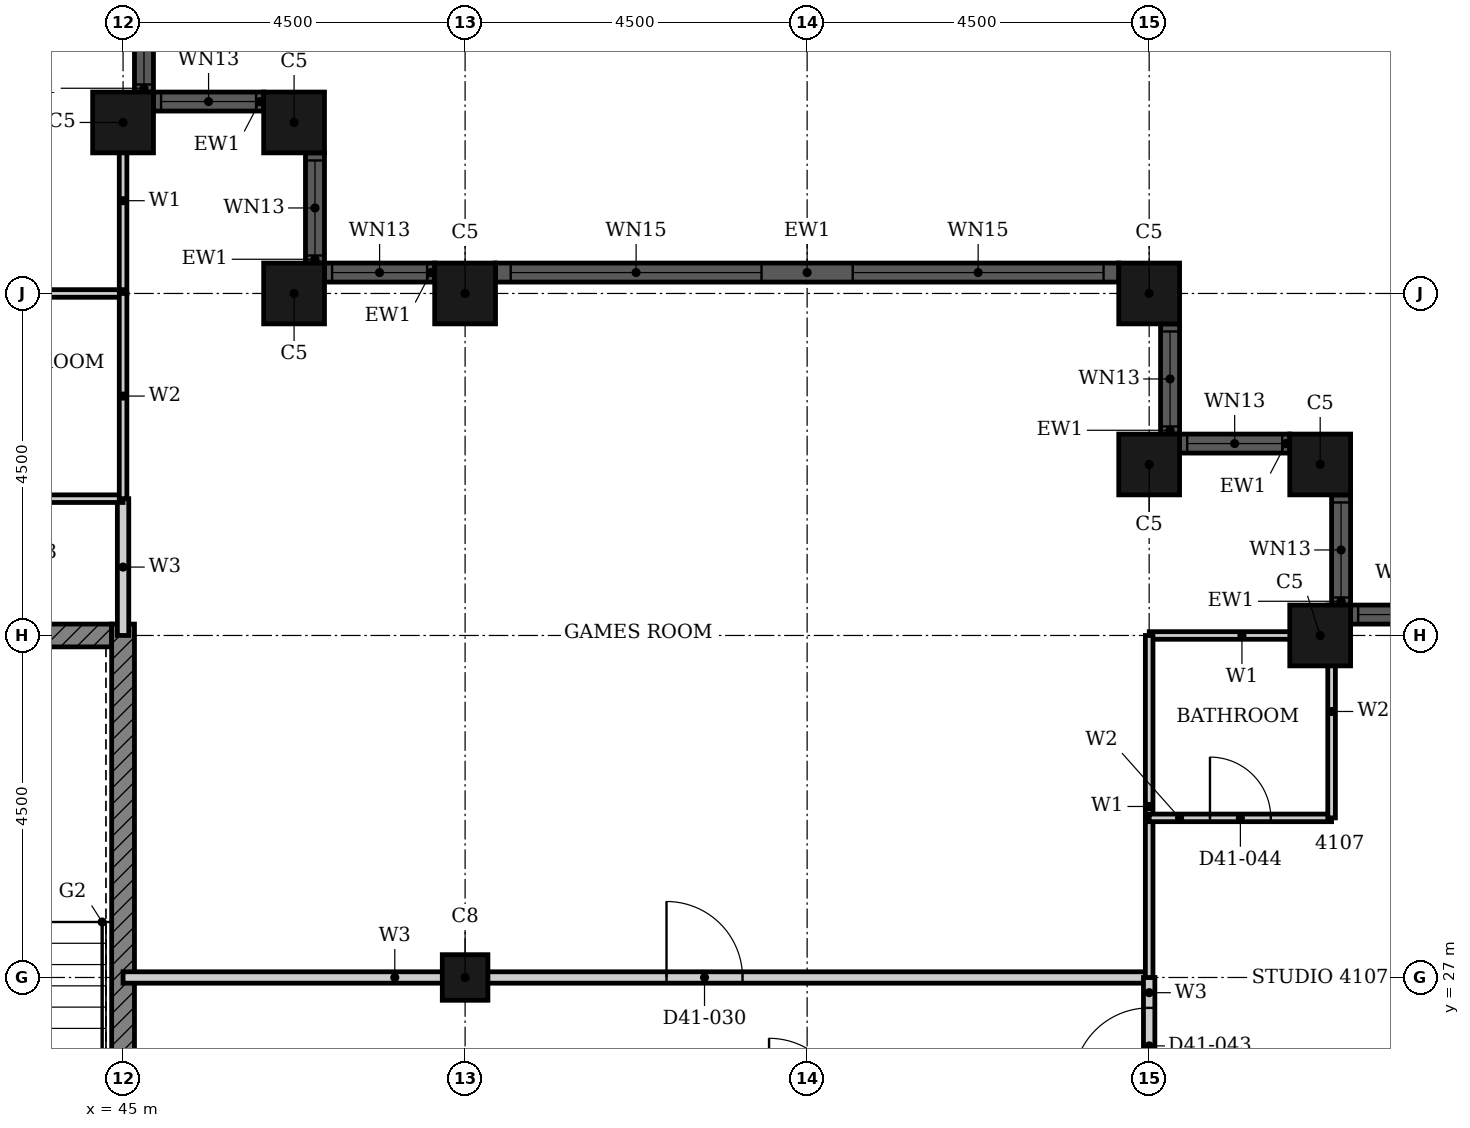
"""IFC4 building model, lengths in metres.
Left out: names, types, materials, properties, quantities, classifications, styles, units other than length and angle.
Written with IfcOpenShell. Run it as: python <this file> out.ifc"""

import sys

from ifc_helpers import new_model, si_unit, direction, frame, frame_2d, origin, origin_2d, place, context, subcontext, project, spatial, rectangle, hollow_rectangle, extrude, element, fill, save


model = new_model("IFC4")
c1 = context("Model", 3, precision=1e-05, world=origin(), true_north=direction((0.0, 1.0)))
c2 = subcontext(c1, "Body", "Model", "MODEL_VIEW")
j1 = project(units=[si_unit("LENGTHUNIT", "METRE"), si_unit("PLANEANGLEUNIT", "RADIAN")], contexts=[c1])
p1 = place(None, origin())
s1 = spatial("IfcSite", under=j1, at=p1, CompositionType="ELEMENT")
p2 = place(p1, origin())
s2 = spatial("IfcBuilding", under=s1, at=p2, CompositionType="ELEMENT")
p3 = place(p2, frame((0.0, 0.0, 165.4)))
s3 = spatial("IfcBuildingStorey", under=s2, at=p3, CompositionType="ELEMENT", Elevation=165.4)
for number, where, z_axis, x_axis in (
    (1, (60.75, 31.5, 0.0), (0.0, 0.0, 1.0), (1.0, 0.0, 0.0)),
    (2, (60.75, 33.75, 0.0), (0.0, 0.0, 1.0), (1.0, 0.0, 0.0)),
    (3, (58.5, 33.75, 0.0), (0.0, 0.0, 1.0), (1.0, 0.0, 0.0)),
    (4, (58.5, 36.0, 0.0), (0.0, 0.0, 1.0), (1.0, 0.0, 0.0)),
    (5, (49.5, 36.0, 0.0), (0.0, 0.0, 1.0), (1.0, 0.0, 0.0)),
    (6, (47.25, 36.0, 0.0), (0.0, 0.0, 1.0), (1.0, 0.0, 0.0)),
    (7, (47.25, 38.25, 0.0), (0.0, 0.0, 1.0), (1.0, 0.0, 0.0)),
    (8, (45.0, 38.25, 0.0), (0.0, 0.0, 1.0), (1.0, 0.0, 0.0)),
):
    element("IfcColumn", number, at=place(p3, frame(where, z_axis=z_axis, x_axis=x_axis)), inside=s3, PredefinedType="COLUMN", context=c2, shape_type="SweptSolid", body=[
        extrude(hollow_rectangle(XDim=0.8, YDim=0.8, WallThickness=0.025, at=origin_2d()), origin(), (0.0, 0.0, 1.0), 3.7),
    ])
p4 = place(p3, frame((49.5, 27.0, 0.0), z_axis=(0.0, 0.0, 1.0), x_axis=(1.0, 0.0, 0.0)))
e9 = element("IfcColumn", 9, at=p4, inside=s3, PredefinedType="COLUMN", context=c2, shape_type="SweptSolid", body=[
    extrude(hollow_rectangle(XDim=0.6, YDim=0.6, WallThickness=0.02, at=origin_2d()), origin(), (0.0, 0.0, 1.0), 3.7),
])
p5 = place(p3, frame((62.6, 31.775, 0.0), z_axis=(0.0, 0.0, 1.0), x_axis=(-1.0, 0.0, 0.0)))
e10 = element("IfcWall", 10, at=p5, inside=s3, PredefinedType="SOLIDWALL", context=c2, shape_type="SweptSolid", body=[
    extrude(rectangle(XDim=1.45, YDim=0.25, at=frame_2d((0.725, 0.0))), origin(), (0.0, 0.0, 1.0), 3.7),
])
p6 = place(p5, frame((0.1, 0.0, 0.9)))
e11 = element("IfcOpeningElement", 11, at=p6, cuts=e10, PredefinedType="OPENING", context=c2, shape_type="SweptSolid", body=[
    extrude(rectangle(XDim=1.25, YDim=1.85, at=frame_2d((0.625, 0.925))), frame((0.0, 0.135, 0.0), z_axis=(0.0, -1.0, 0.0), x_axis=(1.0, 0.0, 0.0)), (0.0, 0.0, 1.0), 0.27),
])
p7 = place(p3, frame((61.025, 31.9, 0.0), z_axis=(0.0, 0.0, 1.0), x_axis=(0.0, 1.0, 0.0)))
e12 = element("IfcWall", 12, at=p7, inside=s3, PredefinedType="SOLIDWALL", context=c2, shape_type="SweptSolid", body=[
    extrude(rectangle(XDim=1.45, YDim=0.25, at=frame_2d((0.725, 0.0))), origin(), (0.0, 0.0, 1.0), 3.7),
])
p8 = place(p7, frame((0.1, 0.0, 0.9)))
e13 = element("IfcOpeningElement", 13, at=p8, cuts=e12, PredefinedType="OPENING", context=c2, shape_type="SweptSolid", body=[
    extrude(rectangle(XDim=1.25, YDim=1.85, at=frame_2d((0.625, 0.925))), frame((0.0, 0.135, 0.0), z_axis=(0.0, -1.0, 0.0), x_axis=(1.0, 0.0, 0.0)), (0.0, 0.0, 1.0), 0.27),
])
p9 = place(p3, frame((60.35, 34.025, 0.0), z_axis=(0.0, 0.0, 1.0), x_axis=(-1.0, 0.0, 0.0)))
e14 = element("IfcWall", 14, at=p9, inside=s3, PredefinedType="SOLIDWALL", context=c2, shape_type="SweptSolid", body=[
    extrude(rectangle(XDim=1.45, YDim=0.25, at=frame_2d((0.725, 0.0))), origin(), (0.0, 0.0, 1.0), 3.7),
])
p10 = place(p9, frame((0.1, 0.0, 0.9)))
e15 = element("IfcOpeningElement", 15, at=p10, cuts=e14, PredefinedType="OPENING", context=c2, shape_type="SweptSolid", body=[
    extrude(rectangle(XDim=1.25, YDim=1.85, at=frame_2d((0.625, 0.925))), frame((0.0, 0.135, 0.0), z_axis=(0.0, -1.0, 0.0), x_axis=(1.0, 0.0, 0.0)), (0.0, 0.0, 1.0), 0.27),
])
p11 = place(p3, frame((58.775, 34.15, 0.0), z_axis=(0.0, 0.0, 1.0), x_axis=(0.0, 1.0, 0.0)))
e16 = element("IfcWall", 16, at=p11, inside=s3, PredefinedType="SOLIDWALL", context=c2, shape_type="SweptSolid", body=[
    extrude(rectangle(XDim=1.45, YDim=0.25, at=frame_2d((0.725, 0.0))), origin(), (0.0, 0.0, 1.0), 3.7),
])
p12 = place(p11, frame((0.1, 0.0, 0.9)))
e17 = element("IfcOpeningElement", 17, at=p12, cuts=e16, PredefinedType="OPENING", context=c2, shape_type="SweptSolid", body=[
    extrude(rectangle(XDim=1.25, YDim=1.85, at=frame_2d((0.625, 0.925))), frame((0.0, 0.135, 0.0), z_axis=(0.0, -1.0, 0.0), x_axis=(1.0, 0.0, 0.0)), (0.0, 0.0, 1.0), 0.27),
])
p13 = place(p3, frame((58.1, 36.275, 0.0), z_axis=(0.0, 0.0, 1.0), x_axis=(-1.0, 0.0, 0.0)))
e18 = element("IfcWall", 18, at=p13, inside=s3, PredefinedType="SOLIDWALL", context=c2, shape_type="SweptSolid", body=[
    extrude(rectangle(XDim=8.2, YDim=0.25, at=frame_2d((4.1, 0.0))), origin(), (0.0, 0.0, 1.0), 3.7),
])
p14 = place(p13, frame((0.2, 0.0, 0.45)))
e19 = element("IfcOpeningElement", 19, at=p14, cuts=e18, PredefinedType="OPENING", context=c2, shape_type="SweptSolid", body=[
    extrude(rectangle(XDim=3.3, YDim=2.3, at=frame_2d((1.65, 1.15))), frame((0.0, 0.135, 0.0), z_axis=(0.0, -1.0, 0.0), x_axis=(1.0, 0.0, 0.0)), (0.0, 0.0, 1.0), 0.27),
])
p15 = place(p13, frame((4.7, 0.0, 0.45)))
e20 = element("IfcOpeningElement", 20, at=p15, cuts=e18, PredefinedType="OPENING", context=c2, shape_type="SweptSolid", body=[
    extrude(rectangle(XDim=3.3, YDim=2.3, at=frame_2d((1.65, 1.15))), frame((0.0, 0.135, 0.0), z_axis=(0.0, -1.0, 0.0), x_axis=(1.0, 0.0, 0.0)), (0.0, 0.0, 1.0), 0.27),
])
p16 = place(p3, frame((49.1, 36.275, 0.0), z_axis=(0.0, 0.0, 1.0), x_axis=(-1.0, 0.0, 0.0)))
e21 = element("IfcWall", 21, at=p16, inside=s3, PredefinedType="SOLIDWALL", context=c2, shape_type="SweptSolid", body=[
    extrude(rectangle(XDim=1.45, YDim=0.25, at=frame_2d((0.725, 0.0))), origin(), (0.0, 0.0, 1.0), 3.7),
])
p17 = place(p16, frame((0.1, 0.0, 0.9)))
e22 = element("IfcOpeningElement", 22, at=p17, cuts=e21, PredefinedType="OPENING", context=c2, shape_type="SweptSolid", body=[
    extrude(rectangle(XDim=1.25, YDim=1.85, at=frame_2d((0.625, 0.925))), frame((0.0, 0.135, 0.0), z_axis=(0.0, -1.0, 0.0), x_axis=(1.0, 0.0, 0.0)), (0.0, 0.0, 1.0), 0.27),
])
p18 = place(p3, frame((47.525, 36.4, 0.0), z_axis=(0.0, 0.0, 1.0), x_axis=(0.0, 1.0, 0.0)))
e23 = element("IfcWall", 23, at=p18, inside=s3, PredefinedType="SOLIDWALL", context=c2, shape_type="SweptSolid", body=[
    extrude(rectangle(XDim=1.45, YDim=0.25, at=frame_2d((0.725, 0.0))), origin(), (0.0, 0.0, 1.0), 3.7),
])
p19 = place(p18, frame((0.1, 0.0, 0.9)))
e24 = element("IfcOpeningElement", 24, at=p19, cuts=e23, PredefinedType="OPENING", context=c2, shape_type="SweptSolid", body=[
    extrude(rectangle(XDim=1.25, YDim=1.85, at=frame_2d((0.625, 0.925))), frame((0.0, 0.135, 0.0), z_axis=(0.0, -1.0, 0.0), x_axis=(1.0, 0.0, 0.0)), (0.0, 0.0, 1.0), 0.27),
])
p20 = place(p3, frame((46.85, 38.525, 0.0), z_axis=(0.0, 0.0, 1.0), x_axis=(-1.0, 0.0, 0.0)))
e25 = element("IfcWall", 25, at=p20, inside=s3, PredefinedType="SOLIDWALL", context=c2, shape_type="SweptSolid", body=[
    extrude(rectangle(XDim=1.45, YDim=0.25, at=frame_2d((0.725, 0.0))), origin(), (0.0, 0.0, 1.0), 3.7),
])
p21 = place(p20, frame((0.1, 0.0, 0.9)))
e26 = element("IfcOpeningElement", 26, at=p21, cuts=e25, PredefinedType="OPENING", context=c2, shape_type="SweptSolid", body=[
    extrude(rectangle(XDim=1.25, YDim=1.85, at=frame_2d((0.625, 0.925))), frame((0.0, 0.135, 0.0), z_axis=(0.0, -1.0, 0.0), x_axis=(1.0, 0.0, 0.0)), (0.0, 0.0, 1.0), 0.27),
])
p22 = place(p3, frame((45.275, 38.65, 0.0), z_axis=(0.0, 0.0, 1.0), x_axis=(0.0, 1.0, 0.0)))
e27 = element("IfcWall", 27, at=p22, inside=s3, PredefinedType="SOLIDWALL", context=c2, shape_type="SweptSolid", body=[
    extrude(rectangle(XDim=1.45, YDim=0.25, at=frame_2d((0.725, 0.0))), origin(), (0.0, 0.0, 1.0), 3.7),
])
p23 = place(p22, frame((0.1, 0.0, 0.9)))
e28 = element("IfcOpeningElement", 28, at=p23, cuts=e27, PredefinedType="OPENING", context=c2, shape_type="SweptSolid", body=[
    extrude(rectangle(XDim=1.25, YDim=1.85, at=frame_2d((0.625, 0.925))), frame((0.0, 0.135, 0.0), z_axis=(0.0, -1.0, 0.0), x_axis=(1.0, 0.0, 0.0)), (0.0, 0.0, 1.0), 0.27),
])
p24 = place(p3, frame((40.625, 31.5, 0.0), z_axis=(0.0, 0.0, 1.0), x_axis=(1.0, 0.0, 0.0)))
e29 = element("IfcWall", 29, at=p24, inside=s3, PredefinedType="SHEAR", context=c2, shape_type="SweptSolid", body=[
    extrude(rectangle(XDim=4.225, YDim=0.3, at=frame_2d((2.113, 0.0))), origin(), (0.0, 0.0, 1.0), 3.4),
])
p25 = place(p3, frame((45.0, 22.35, 0.0), z_axis=(0.0, 0.0, 1.0), x_axis=(0.0, 1.0, 0.0)))
e30 = element("IfcWall", 30, at=p25, inside=s3, PredefinedType="SHEAR", context=c2, shape_type="SweptSolid", body=[
    extrude(rectangle(XDim=9.3, YDim=0.3, at=frame_2d((4.65, 0.0))), origin(), (0.0, 0.0, 1.0), 3.4),
])
p26 = place(p3, frame((45.0, 27.0, 0.0), z_axis=(0.0, 0.0, 1.0), x_axis=(1.0, 0.0, 0.0)))
e31 = element("IfcWall", 31, at=p26, inside=s3, PredefinedType="PARTITIONING", context=c2, shape_type="SweptSolid", body=[
    extrude(rectangle(XDim=13.5, YDim=0.15, at=frame_2d((6.75, 0.0))), origin(), (0.0, 0.0, 1.0), 2.68),
])
p27 = place(p26, frame((7.15, 0.0, 0.0)))
e32 = element("IfcOpeningElement", 32, at=p27, cuts=e31, PredefinedType="OPENING", context=c2, shape_type="SweptSolid", body=[
    extrude(rectangle(XDim=1.0, YDim=2.1, at=frame_2d((0.5, 1.05))), frame((0.0, 0.085, 0.0), z_axis=(0.0, -1.0, 0.0), x_axis=(1.0, 0.0, 0.0)), (0.0, 0.0, 1.0), 0.17),
])
p28 = place(p3, frame((45.0, 31.5, 0.0), z_axis=(0.0, 0.0, 1.0), x_axis=(0.0, 1.0, 0.0)))
e33 = element("IfcWall", 33, at=p28, inside=s3, PredefinedType="PARTITIONING", context=c2, shape_type="SweptSolid", body=[
    extrude(rectangle(XDim=1.8, YDim=0.15, at=frame_2d((0.9, 0.0))), origin(), (0.0, 0.0, 1.0), 3.4),
])
p29 = place(p3, frame((58.5, 25.2, 0.0), z_axis=(0.0, 0.0, 1.0), x_axis=(0.0, 1.0, 0.0)))
e34 = element("IfcWall", 34, at=p29, inside=s3, PredefinedType="PARTITIONING", context=c2, shape_type="SweptSolid", body=[
    extrude(rectangle(XDim=1.8, YDim=0.15, at=frame_2d((0.9, 0.0))), origin(), (0.0, 0.0, 1.0), 3.4),
])
p30 = place(p29, frame((0.4, 0.0, 0.0)))
e35 = element("IfcOpeningElement", 35, at=p30, cuts=e34, PredefinedType="OPENING", context=c2, shape_type="SweptSolid", body=[
    extrude(rectangle(XDim=1.0, YDim=2.2, at=frame_2d((0.5, 1.1))), frame((0.0, 0.085, 0.0), z_axis=(0.0, -1.0, 0.0), x_axis=(1.0, 0.0, 0.0)), (0.0, 0.0, 1.0), 0.17),
])
p31 = place(p3, frame((58.501, 31.5, 0.0), z_axis=(0.0, 0.0, 1.0), x_axis=(1.0, 0.0, 0.0)))
e36 = element("IfcWall", 36, at=p31, inside=s3, PredefinedType="PARTITIONING", context=c2, shape_type="SweptSolid", body=[
    extrude(rectangle(XDim=2.439, YDim=0.1, at=frame_2d((1.219, 0.0))), origin(), (0.0, 0.0, 1.0), 2.68),
])
p32 = place(p3, frame((45.0, 36.001, 0.0), z_axis=(0.0, 0.0, 1.0), x_axis=(0.0, 1.0, 0.0)))
e37 = element("IfcWall", 37, at=p32, inside=s3, PredefinedType="PARTITIONING", context=c2, shape_type="SweptSolid", body=[
    extrude(rectangle(XDim=2.439, YDim=0.1, at=frame_2d((1.219, 0.0))), origin(), (0.0, 0.0, 1.0), 3.4),
])
p33 = place(p3, frame((58.5, 27.0, 0.0), z_axis=(0.0, 0.0, 1.0), x_axis=(0.0, 1.0, 0.0)))
e38 = element("IfcWall", 38, at=p33, inside=s3, PredefinedType="PARTITIONING", context=c2, shape_type="SweptSolid", body=[
    extrude(rectangle(XDim=4.5, YDim=0.1, at=frame_2d((2.25, 0.0))), origin(), (0.0, 0.0, 1.0), 3.4),
])
p34 = place(p3, frame((58.5, 29.1, 0.0), z_axis=(0.0, 0.0, 1.0), x_axis=(1.0, 0.0, 0.0)))
e39 = element("IfcWall", 39, at=p34, inside=s3, PredefinedType="PARTITIONING", context=c2, shape_type="SweptSolid", body=[
    extrude(rectangle(XDim=2.4, YDim=0.1, at=frame_2d((1.2, 0.0))), origin(), (0.0, 0.0, 1.0), 3.4),
])
p35 = place(p34, frame((0.8, 0.0, 0.0)))
e40 = element("IfcOpeningElement", 40, at=p35, cuts=e39, PredefinedType="OPENING", context=c2, shape_type="SweptSolid", body=[
    extrude(rectangle(XDim=0.8, YDim=2.1, at=frame_2d((0.4, 1.05))), frame((0.0, 0.06, 0.0), z_axis=(0.0, -1.0, 0.0), x_axis=(1.0, 0.0, 0.0)), (0.0, 0.0, 1.0), 0.12),
])
for number, where, z_axis, x_axis in (
    (41, (42.6, 33.3, 0.0), (0.0, 0.0, 1.0), (1.0, 0.0, 0.0)),
    (42, (42.6, 36.0, 0.0), (0.0, 0.0, 1.0), (1.0, 0.0, 0.0)),
):
    element("IfcWall", number, at=place(p3, frame(where, z_axis=z_axis, x_axis=x_axis)), inside=s3, PredefinedType="PARTITIONING", context=c2, shape_type="SweptSolid", body=[
        extrude(rectangle(XDim=2.4, YDim=0.1, at=frame_2d((1.2, 0.0))), origin(), (0.0, 0.0, 1.0), 3.4),
    ])
p36 = place(p3, frame((45.0, 33.3, 0.0), z_axis=(0.0, 0.0, 1.0), x_axis=(0.0, 1.0, 0.0)))
e43 = element("IfcWall", 43, at=p36, inside=s3, PredefinedType="PARTITIONING", context=c2, shape_type="SweptSolid", body=[
    extrude(rectangle(XDim=2.7, YDim=0.1, at=frame_2d((1.35, 0.0))), origin(), (0.0, 0.0, 1.0), 3.4),
])
p37 = place(p3, frame((60.9, 29.1, 0.0), z_axis=(0.0, 0.0, 1.0), x_axis=(0.0, 1.0, 0.0)))
e44 = element("IfcWall", 44, at=p37, inside=s3, PredefinedType="PARTITIONING", context=c2, shape_type="SweptSolid", body=[
    extrude(rectangle(XDim=2.8, YDim=0.1, at=frame_2d((1.4, 0.0))), origin(), (0.0, 0.0, 1.0), 3.4),
])
p38 = place(p6, origin())
e45 = element("IfcWindow", 45, at=p38, inside=s3, PartitioningType="SINGLE_PANEL", PredefinedType="WINDOW", context=c2, shape_type="SweptSolid", body=[
    extrude(rectangle(XDim=1.25, YDim=1.85, at=frame_2d((0.625, 0.925))), frame((0.0, 0.03, 0.0), z_axis=(0.0, -1.0, 0.0), x_axis=(1.0, 0.0, 0.0)), (0.0, 0.0, 1.0), 0.06),
])
fill(e11, e45)
p39 = place(p8, origin())
e46 = element("IfcWindow", 46, at=p39, inside=s3, PartitioningType="SINGLE_PANEL", PredefinedType="WINDOW", context=c2, shape_type="SweptSolid", body=[
    extrude(rectangle(XDim=1.25, YDim=1.85, at=frame_2d((0.625, 0.925))), frame((0.0, 0.03, 0.0), z_axis=(0.0, -1.0, 0.0), x_axis=(1.0, 0.0, 0.0)), (0.0, 0.0, 1.0), 0.06),
])
fill(e13, e46)
p40 = place(p10, origin())
e47 = element("IfcWindow", 47, at=p40, inside=s3, PartitioningType="SINGLE_PANEL", PredefinedType="WINDOW", context=c2, shape_type="SweptSolid", body=[
    extrude(rectangle(XDim=1.25, YDim=1.85, at=frame_2d((0.625, 0.925))), frame((0.0, 0.03, 0.0), z_axis=(0.0, -1.0, 0.0), x_axis=(1.0, 0.0, 0.0)), (0.0, 0.0, 1.0), 0.06),
])
fill(e15, e47)
p41 = place(p12, origin())
e48 = element("IfcWindow", 48, at=p41, inside=s3, PartitioningType="SINGLE_PANEL", PredefinedType="WINDOW", context=c2, shape_type="SweptSolid", body=[
    extrude(rectangle(XDim=1.25, YDim=1.85, at=frame_2d((0.625, 0.925))), frame((0.0, 0.03, 0.0), z_axis=(0.0, -1.0, 0.0), x_axis=(1.0, 0.0, 0.0)), (0.0, 0.0, 1.0), 0.06),
])
fill(e17, e48)
p42 = place(p14, origin())
e49 = element("IfcWindow", 49, at=p42, inside=s3, PartitioningType="SINGLE_PANEL", PredefinedType="WINDOW", context=c2, shape_type="SweptSolid", body=[
    extrude(rectangle(XDim=3.3, YDim=2.3, at=frame_2d((1.65, 1.15))), frame((0.0, 0.03, 0.0), z_axis=(0.0, -1.0, 0.0), x_axis=(1.0, 0.0, 0.0)), (0.0, 0.0, 1.0), 0.06),
])
fill(e19, e49)
p43 = place(p15, origin())
e50 = element("IfcWindow", 50, at=p43, inside=s3, PartitioningType="SINGLE_PANEL", PredefinedType="WINDOW", context=c2, shape_type="SweptSolid", body=[
    extrude(rectangle(XDim=3.3, YDim=2.3, at=frame_2d((1.65, 1.15))), frame((0.0, 0.03, 0.0), z_axis=(0.0, -1.0, 0.0), x_axis=(1.0, 0.0, 0.0)), (0.0, 0.0, 1.0), 0.06),
])
fill(e20, e50)
p44 = place(p17, origin())
e51 = element("IfcWindow", 51, at=p44, inside=s3, PartitioningType="SINGLE_PANEL", PredefinedType="WINDOW", context=c2, shape_type="SweptSolid", body=[
    extrude(rectangle(XDim=1.25, YDim=1.85, at=frame_2d((0.625, 0.925))), frame((0.0, 0.03, 0.0), z_axis=(0.0, -1.0, 0.0), x_axis=(1.0, 0.0, 0.0)), (0.0, 0.0, 1.0), 0.06),
])
fill(e22, e51)
p45 = place(p19, origin())
e52 = element("IfcWindow", 52, at=p45, inside=s3, PartitioningType="SINGLE_PANEL", PredefinedType="WINDOW", context=c2, shape_type="SweptSolid", body=[
    extrude(rectangle(XDim=1.25, YDim=1.85, at=frame_2d((0.625, 0.925))), frame((0.0, 0.03, 0.0), z_axis=(0.0, -1.0, 0.0), x_axis=(1.0, 0.0, 0.0)), (0.0, 0.0, 1.0), 0.06),
])
fill(e24, e52)
p46 = place(p21, origin())
e53 = element("IfcWindow", 53, at=p46, inside=s3, PartitioningType="SINGLE_PANEL", PredefinedType="WINDOW", context=c2, shape_type="SweptSolid", body=[
    extrude(rectangle(XDim=1.25, YDim=1.85, at=frame_2d((0.625, 0.925))), frame((0.0, 0.03, 0.0), z_axis=(0.0, -1.0, 0.0), x_axis=(1.0, 0.0, 0.0)), (0.0, 0.0, 1.0), 0.06),
])
fill(e26, e53)
p47 = place(p23, origin())
e54 = element("IfcWindow", 54, at=p47, inside=s3, PartitioningType="SINGLE_PANEL", PredefinedType="WINDOW", context=c2, shape_type="SweptSolid", body=[
    extrude(rectangle(XDim=1.25, YDim=1.85, at=frame_2d((0.625, 0.925))), frame((0.0, 0.03, 0.0), z_axis=(0.0, -1.0, 0.0), x_axis=(1.0, 0.0, 0.0)), (0.0, 0.0, 1.0), 0.06),
])
fill(e28, e54)
p48 = place(p27, origin())
e55 = element("IfcDoor", 55, at=p48, inside=s3, OperationType="SINGLE_SWING_RIGHT", PredefinedType="DOOR", context=c2, shape_type="SweptSolid", body=[
    extrude(rectangle(XDim=1.0, YDim=2.1, at=frame_2d((0.5, 1.05))), frame((0.0, 0.025, 0.0), z_axis=(0.0, -1.0, 0.0), x_axis=(1.0, 0.0, 0.0)), (0.0, 0.0, 1.0), 0.05),
])
fill(e32, e55)
p49 = place(p30, origin())
e56 = element("IfcDoor", 56, at=p49, inside=s3, OperationType="SINGLE_SWING_LEFT", PredefinedType="DOOR", context=c2, shape_type="SweptSolid", body=[
    extrude(rectangle(XDim=1.0, YDim=2.2, at=frame_2d((0.5, 1.1))), frame((0.0, 0.025, 0.0), z_axis=(0.0, -1.0, 0.0), x_axis=(1.0, 0.0, 0.0)), (0.0, 0.0, 1.0), 0.05),
])
fill(e35, e56)
p50 = place(p35, origin())
e57 = element("IfcDoor", 57, at=p50, inside=s3, OperationType="SINGLE_SWING_LEFT", PredefinedType="DOOR", context=c2, shape_type="SweptSolid", body=[
    extrude(rectangle(XDim=0.8, YDim=2.1, at=frame_2d((0.4, 1.05))), frame((0.0, 0.025, 0.0), z_axis=(0.0, -1.0, 0.0), x_axis=(1.0, 0.0, 0.0)), (0.0, 0.0, 1.0), 0.05),
])
fill(e40, e57)
save(model, sys.argv[1])
